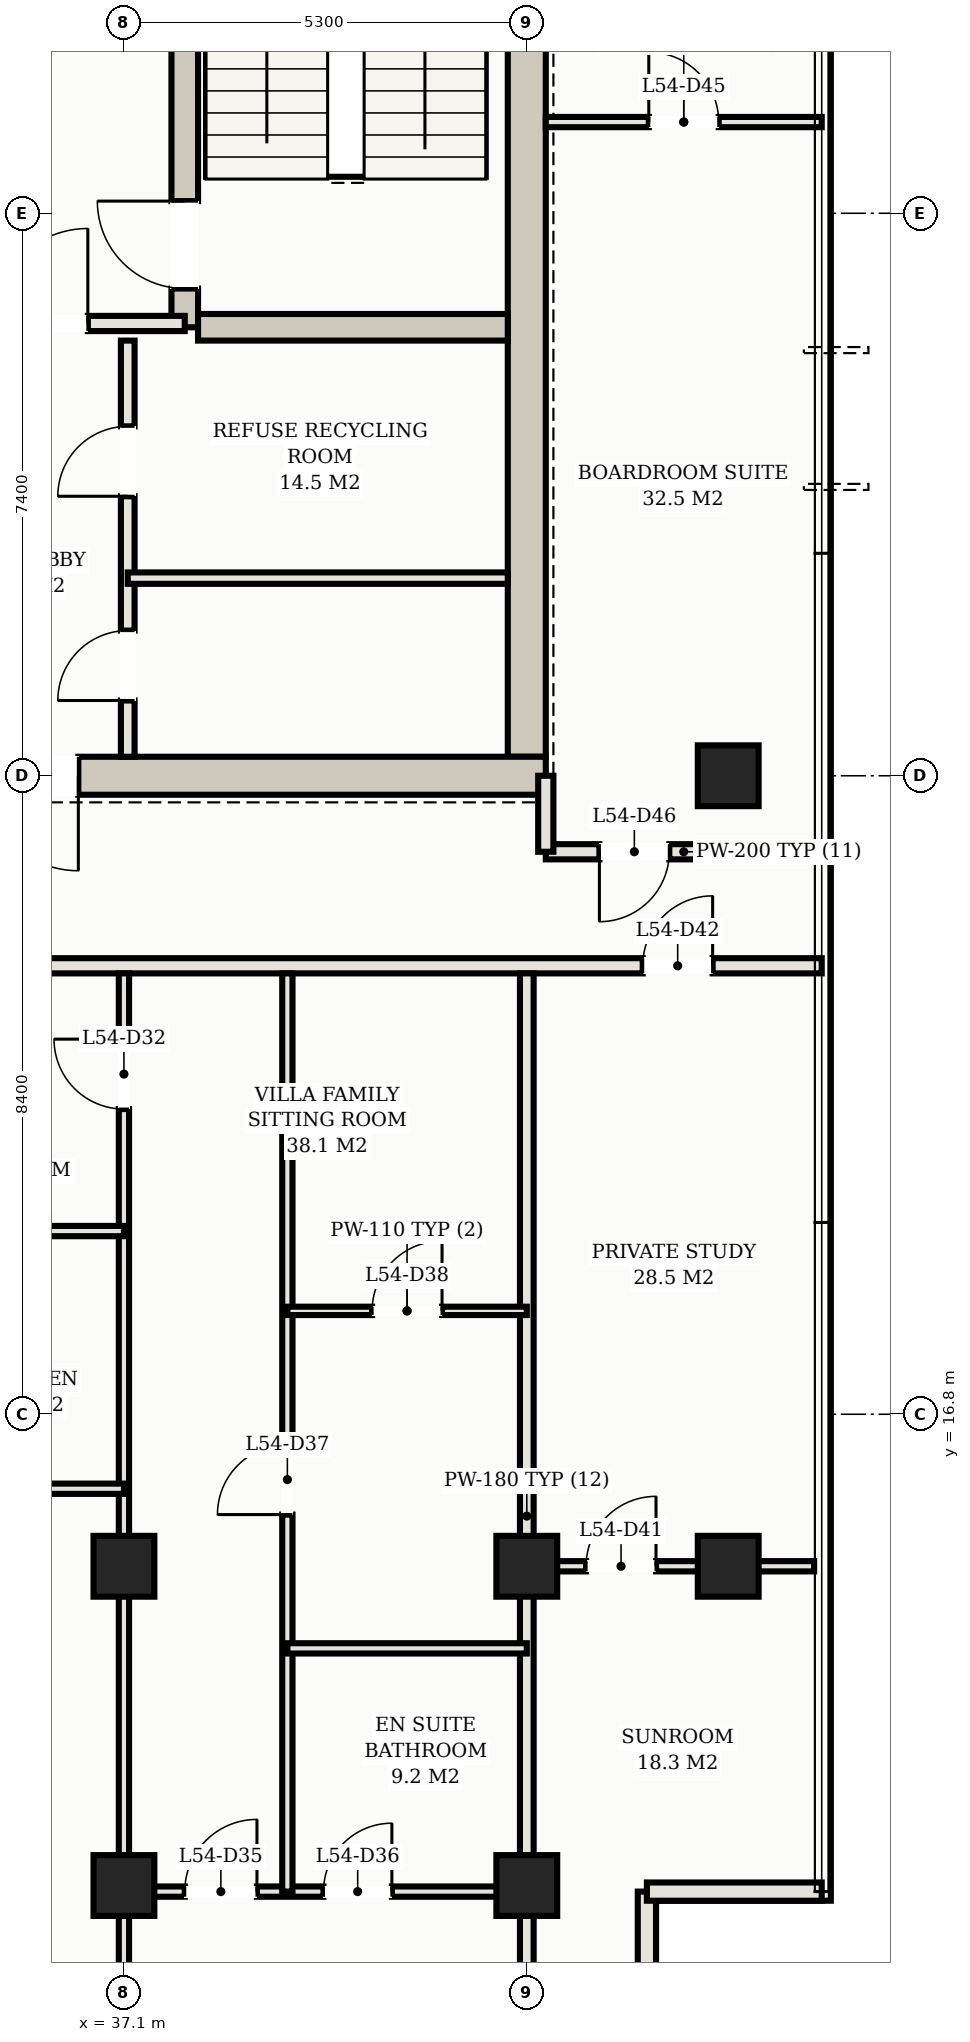
"""IFC4 building model, lengths in metres.
Left out: names, types, materials, properties, quantities, classifications, styles, units other than length and angle.
Written with IfcOpenShell. Run it as: python <this file> out.ifc"""

import sys

from ifc_helpers import new_model, si_unit, direction, frame, frame_2d, origin, origin_2d, place, context, subcontext, project, spatial, rectangle, hollow_rectangle, extrude, element, fill, save


model = new_model("IFC4")
c1 = context("Model", 3, precision=1e-05, world=origin(), true_north=direction((0.0, 1.0)))
c2 = subcontext(c1, "Body", "Model", "MODEL_VIEW")
j1 = project(units=[si_unit("LENGTHUNIT", "METRE"), si_unit("PLANEANGLEUNIT", "RADIAN")], contexts=[c1])
p1 = place(None, origin())
s1 = spatial("IfcSite", under=j1, at=p1, CompositionType="ELEMENT")
p2 = place(p1, origin())
s2 = spatial("IfcBuilding", under=s1, at=p2, CompositionType="ELEMENT")
p3 = place(p2, frame((0.0, 0.0, 200.0)))
s3 = spatial("IfcBuildingStorey", under=s2, at=p3, CompositionType="ELEMENT", Elevation=200.0)
p4 = place(p3, frame((42.4, 25.45, 0.0), z_axis=(0.0, 0.0, 1.0), x_axis=(0.0, 1.0, 0.0)))
e1 = element("IfcWall", 1, at=p4, inside=s3, PredefinedType="SHEAR", context=c2, shape_type="SweptSolid", body=[
    extrude(rectangle(XDim=14.3, YDim=0.5, at=frame_2d((7.15, 0.0))), origin(), (0.0, 0.0, 1.0), 3.11),
])
p5 = place(p3, frame((34.6, 25.2, 0.0), z_axis=(0.0, 0.0, 1.0), x_axis=(1.0, 0.0, 0.0)))
e2 = element("IfcWall", 2, at=p5, inside=s3, PredefinedType="SHEAR", context=c2, shape_type="SweptSolid", body=[
    extrude(rectangle(XDim=8.05, YDim=0.5, at=frame_2d((4.025, 0.0))), origin(), (0.0, 0.0, 1.0), 3.11),
])
p6 = place(p5, frame((0.65, 0.0, 0.0)))
e3 = element("IfcOpeningElement", 3, at=p6, cuts=e2, PredefinedType="OPENING", context=c2, shape_type="SweptSolid", body=[
    extrude(rectangle(XDim=1.25, YDim=2.2, at=frame_2d((0.625, 1.1))), frame((0.0, 0.26, 0.0), z_axis=(0.0, -1.0, 0.0), x_axis=(1.0, 0.0, 0.0)), (0.0, 0.0, 1.0), 0.52),
])
p7 = place(p3, frame((37.9, 31.1, 0.0), z_axis=(0.0, 0.0, 1.0), x_axis=(0.0, 1.0, 0.0)))
e4 = element("IfcWall", 4, at=p7, inside=s3, PredefinedType="SHEAR", context=c2, shape_type="SweptSolid", body=[
    extrude(rectangle(XDim=8.65, YDim=0.35, at=frame_2d((4.325, 0.0))), origin(), (0.0, 0.0, 1.0), 3.11),
])
p8 = place(p7, frame((0.51, 0.0, 0.0)))
e5 = element("IfcOpeningElement", 5, at=p8, cuts=e4, PredefinedType="OPENING", context=c2, shape_type="SweptSolid", body=[
    extrude(rectangle(XDim=1.15, YDim=2.2, at=frame_2d((0.575, 1.1))), frame((0.0, 0.185, 0.0), z_axis=(0.0, -1.0, 0.0), x_axis=(1.0, 0.0, 0.0)), (0.0, 0.0, 1.0), 0.37),
])
p9 = place(p3, frame((38.075, 31.1, 0.0), z_axis=(0.0, 0.0, 1.0), x_axis=(1.0, 0.0, 0.0)))
e6 = element("IfcWall", 6, at=p9, inside=s3, PredefinedType="SHEAR", context=c2, shape_type="SweptSolid", body=[
    extrude(rectangle(XDim=4.075, YDim=0.35, at=frame_2d((2.038, 0.0))), origin(), (0.0, 0.0, 1.0), 3.11),
])
for number, where, z_axis, x_axis in (
    (7, (37.1, 14.8, 0.0), (0.0, 0.0, 1.0), (1.0, 0.0, 0.0)),
    (8, (37.1, 10.6, 0.0), (0.0, 0.0, 1.0), (1.0, 0.0, 0.0)),
    (9, (42.4, 14.8, 0.0), (0.0, 0.0, 1.0), (1.0, 0.0, 0.0)),
    (10, (42.4, 10.6, 0.0), (0.0, 0.0, 1.0), (1.0, 0.0, 0.0)),
    (11, (45.05, 14.8, 0.0), (0.0, 0.0, 1.0), (1.0, 0.0, 0.0)),
    (12, (45.05, 25.2, 0.0), (0.0, 0.0, 1.0), (1.0, 0.0, 0.0)),
):
    element("IfcColumn", number, at=place(p3, frame(where, z_axis=z_axis, x_axis=x_axis)), inside=s3, PredefinedType="COLUMN", context=c2, shape_type="SweptSolid", body=[
        extrude(hollow_rectangle(XDim=0.8, YDim=0.8, WallThickness=0.028, at=origin_2d()), origin(), (0.0, 0.0, 1.0), 3.3),
    ])
for number, where, z_axis, x_axis in (
    (13, (43.98, 8.22, 0.0), (0.0, 0.0, 1.0), (0.0, 1.0, 0.0)),
    (14, (43.98, 10.52, 0.0), (0.0, 0.0, 1.0), (1.0, 0.0, 0.0)),
):
    element("IfcWall", number, at=place(p3, frame(where, z_axis=z_axis, x_axis=x_axis)), inside=s3, PredefinedType="SOLIDWALL", context=c2, shape_type="SweptSolid", body=[
        extrude(rectangle(XDim=2.3, YDim=0.24, at=frame_2d((1.15, 0.0))), origin(), (0.0, 0.0, 1.0), 3.11),
    ])
p10 = place(p3, frame((34.65, 31.15, 0.0), z_axis=(0.0, 0.0, 1.0), x_axis=(1.0, 0.0, 0.0)))
e15 = element("IfcWall", 15, at=p10, inside=s3, PredefinedType="PARTITIONING", context=c2, shape_type="SweptSolid", body=[
    extrude(rectangle(XDim=3.25, YDim=0.2, at=frame_2d((1.625, 0.0))), origin(), (0.0, 0.0, 1.0), 2.43),
])
p11 = place(p10, frame((0.725, 0.0, 0.0)))
e16 = element("IfcOpeningElement", 16, at=p11, cuts=e15, PredefinedType="OPENING", context=c2, shape_type="SweptSolid", body=[
    extrude(rectangle(XDim=1.25, YDim=2.2, at=frame_2d((0.625, 1.1))), frame((0.0, 0.11, 0.0), z_axis=(0.0, -1.0, 0.0), x_axis=(1.0, 0.0, 0.0)), (0.0, 0.0, 1.0), 0.22),
])
p12 = place(p3, frame((37.15, 25.45, 0.0), z_axis=(0.0, 0.0, 1.0), x_axis=(0.0, 1.0, 0.0)))
e17 = element("IfcWall", 17, at=p12, inside=s3, PredefinedType="PARTITIONING", context=c2, shape_type="SweptSolid", body=[
    extrude(rectangle(XDim=5.475, YDim=0.18, at=frame_2d((2.738, 0.0))), origin(), (0.0, 0.0, 1.0), 2.43),
])
p13 = place(p12, frame((0.74, 0.0, 0.0)))
e18 = element("IfcOpeningElement", 18, at=p13, cuts=e17, PredefinedType="OPENING", context=c2, shape_type="SweptSolid", body=[
    extrude(rectangle(XDim=0.92, YDim=2.15, at=frame_2d((0.46, 1.075))), frame((0.0, 0.1, 0.0), z_axis=(0.0, -1.0, 0.0), x_axis=(1.0, 0.0, 0.0)), (0.0, 0.0, 1.0), 0.2),
])
p14 = place(p12, frame((3.427, 0.0, 0.0)))
e19 = element("IfcOpeningElement", 19, at=p14, cuts=e17, PredefinedType="OPENING", context=c2, shape_type="SweptSolid", body=[
    extrude(rectangle(XDim=0.92, YDim=2.15, at=frame_2d((0.46, 1.075))), frame((0.0, 0.1, 0.0), z_axis=(0.0, -1.0, 0.0), x_axis=(1.0, 0.0, 0.0)), (0.0, 0.0, 1.0), 0.2),
])
p15 = place(p3, frame((37.15, 27.8, 0.0), z_axis=(0.0, 0.0, 1.0), x_axis=(1.0, 0.0, 0.0)))
e20 = element("IfcWall", 20, at=p15, inside=s3, PredefinedType="PARTITIONING", context=c2, shape_type="SweptSolid", body=[
    extrude(rectangle(XDim=5.0, YDim=0.15, at=frame_2d((2.5, 0.0))), origin(), (0.0, 0.0, 1.0), 2.43),
])
p16 = place(p3, frame((6.72, 22.7, 0.0), z_axis=(0.0, 0.0, 1.0), x_axis=(1.0, 0.0, 0.0)))
e21 = element("IfcWall", 21, at=p16, inside=s3, PredefinedType="PARTITIONING", context=c2, shape_type="SweptSolid", body=[
    extrude(rectangle(XDim=39.56, YDim=0.2, at=frame_2d((19.78, 0.0))), origin(), (0.0, 0.0, 1.0), 2.43),
])
p17 = place(p16, frame((4.63, 0.0, 0.0)))
e22 = element("IfcOpeningElement", 22, at=p17, cuts=e21, PredefinedType="OPENING", context=c2, shape_type="SweptSolid", body=[
    extrude(rectangle(XDim=1.1, YDim=2.25, at=frame_2d((0.55, 1.125))), frame((0.0, 0.11, 0.0), z_axis=(0.0, -1.0, 0.0), x_axis=(1.0, 0.0, 0.0)), (0.0, 0.0, 1.0), 0.22),
])
p18 = place(p16, frame((9.93, 0.0, 0.0)))
e23 = element("IfcOpeningElement", 23, at=p18, cuts=e21, PredefinedType="OPENING", context=c2, shape_type="SweptSolid", body=[
    extrude(rectangle(XDim=1.1, YDim=2.25, at=frame_2d((0.55, 1.125))), frame((0.0, 0.11, 0.0), z_axis=(0.0, -1.0, 0.0), x_axis=(1.0, 0.0, 0.0)), (0.0, 0.0, 1.0), 0.22),
])
p19 = place(p16, frame((25.83, 0.0, 0.0)))
e24 = element("IfcOpeningElement", 24, at=p19, cuts=e21, PredefinedType="OPENING", context=c2, shape_type="SweptSolid", body=[
    extrude(rectangle(XDim=1.1, YDim=2.25, at=frame_2d((0.55, 1.125))), frame((0.0, 0.11, 0.0), z_axis=(0.0, -1.0, 0.0), x_axis=(1.0, 0.0, 0.0)), (0.0, 0.0, 1.0), 0.22),
])
p20 = place(p16, frame((1.435, 0.0, 0.0)))
e25 = element("IfcOpeningElement", 25, at=p20, cuts=e21, PredefinedType="OPENING", context=c2, shape_type="SweptSolid", body=[
    extrude(rectangle(XDim=0.92, YDim=2.15, at=frame_2d((0.46, 1.075))), frame((0.0, 0.11, 0.0), z_axis=(0.0, -1.0, 0.0), x_axis=(1.0, 0.0, 0.0)), (0.0, 0.0, 1.0), 0.22),
])
p21 = place(p16, frame((37.205, 0.0, 0.0)))
e26 = element("IfcOpeningElement", 26, at=p21, cuts=e21, PredefinedType="OPENING", context=c2, shape_type="SweptSolid", body=[
    extrude(rectangle(XDim=0.92, YDim=2.15, at=frame_2d((0.46, 1.075))), frame((0.0, 0.11, 0.0), z_axis=(0.0, -1.0, 0.0), x_axis=(1.0, 0.0, 0.0)), (0.0, 0.0, 1.0), 0.22),
])
p22 = place(p3, frame((42.65, 24.2, 0.0), z_axis=(0.0, 0.0, 1.0), x_axis=(1.0, 0.0, 0.0)))
e27 = element("IfcWall", 27, at=p22, inside=s3, PredefinedType="PARTITIONING", context=c2, shape_type="SweptSolid", body=[
    extrude(rectangle(XDim=3.63, YDim=0.2, at=frame_2d((1.815, 0.0))), origin(), (0.0, 0.0, 1.0), 2.43),
])
p23 = place(p22, frame((0.705, 0.0, 0.0)))
e28 = element("IfcOpeningElement", 28, at=p23, cuts=e27, PredefinedType="OPENING", context=c2, shape_type="SweptSolid", body=[
    extrude(rectangle(XDim=0.92, YDim=2.15, at=frame_2d((0.46, 1.075))), frame((0.0, 0.11, 0.0), z_axis=(0.0, -1.0, 0.0), x_axis=(1.0, 0.0, 0.0)), (0.0, 0.0, 1.0), 0.22),
])
p24 = place(p3, frame((42.65, 24.2, 0.0), z_axis=(0.0, 0.0, 1.0), x_axis=(0.0, 1.0, 0.0)))
e29 = element("IfcWall", 29, at=p24, inside=s3, PredefinedType="PARTITIONING", context=c2, shape_type="SweptSolid", body=[
    extrude(rectangle(XDim=1.0, YDim=0.2, at=frame_2d((0.5, 0.0))), origin(), (0.0, 0.0, 1.0), 2.43),
])
p25 = place(p3, frame((42.4, 8.32, 0.0), z_axis=(0.0, 0.0, 1.0), x_axis=(0.0, 1.0, 0.0)))
e30 = element("IfcWall", 30, at=p25, inside=s3, PredefinedType="PARTITIONING", context=c2, shape_type="SweptSolid", body=[
    extrude(rectangle(XDim=14.28, YDim=0.18, at=frame_2d((7.14, 0.0))), origin(), (0.0, 0.0, 1.0), 2.43),
])
p26 = place(p3, frame((37.1, 6.02, 0.0), z_axis=(0.0, 0.0, 1.0), x_axis=(0.0, 1.0, 0.0)))
e31 = element("IfcWall", 31, at=p26, inside=s3, PredefinedType="PARTITIONING", context=c2, shape_type="SweptSolid", body=[
    extrude(rectangle(XDim=16.58, YDim=0.135, at=frame_2d((8.29, 0.0))), origin(), (0.0, 0.0, 1.0), 2.43),
])
p27 = place(p26, frame((14.795, 0.0, 0.0)))
e32 = element("IfcOpeningElement", 32, at=p27, cuts=e31, PredefinedType="OPENING", context=c2, shape_type="SweptSolid", body=[
    extrude(rectangle(XDim=0.92, YDim=2.15, at=frame_2d((0.46, 1.075))), frame((0.0, 0.078, 0.0), z_axis=(0.0, -1.0, 0.0), x_axis=(1.0, 0.0, 0.0)), (0.0, 0.0, 1.0), 0.155),
])
for number, where, z_axis, x_axis in (
    (33, (33.95, 15.82, 0.0), (0.0, 0.0, 1.0), (1.0, 0.0, 0.0)),
    (34, (33.95, 19.21, 0.0), (0.0, 0.0, 1.0), (1.0, 0.0, 0.0)),
):
    element("IfcWall", number, at=place(p3, frame(where, z_axis=z_axis, x_axis=x_axis)), inside=s3, PredefinedType="PARTITIONING", context=c2, shape_type="SweptSolid", body=[
        extrude(rectangle(XDim=3.15, YDim=0.135, at=frame_2d((1.575, 0.0))), origin(), (0.0, 0.0, 1.0), 2.43),
    ])
p28 = place(p3, frame((37.1, 10.52, 0.0), z_axis=(0.0, 0.0, 1.0), x_axis=(1.0, 0.0, 0.0)))
e35 = element("IfcWall", 35, at=p28, inside=s3, PredefinedType="PARTITIONING", context=c2, shape_type="SweptSolid", body=[
    extrude(rectangle(XDim=5.3, YDim=0.135, at=frame_2d((2.65, 0.0))), origin(), (0.0, 0.0, 1.0), 2.43),
])
p29 = place(p28, frame((0.8, 0.0, 0.0)))
e36 = element("IfcOpeningElement", 36, at=p29, cuts=e35, PredefinedType="OPENING", context=c2, shape_type="SweptSolid", body=[
    extrude(rectangle(XDim=0.95, YDim=2.15, at=frame_2d((0.475, 1.075))), frame((0.0, 0.078, 0.0), z_axis=(0.0, -1.0, 0.0), x_axis=(1.0, 0.0, 0.0)), (0.0, 0.0, 1.0), 0.155),
])
p30 = place(p28, frame((2.625, 0.0, 0.0)))
e37 = element("IfcOpeningElement", 37, at=p30, cuts=e35, PredefinedType="OPENING", context=c2, shape_type="SweptSolid", body=[
    extrude(rectangle(XDim=0.9, YDim=2.15, at=frame_2d((0.45, 1.075))), frame((0.0, 0.078, 0.0), z_axis=(0.0, -1.0, 0.0), x_axis=(1.0, 0.0, 0.0)), (0.0, 0.0, 1.0), 0.155),
])
p31 = place(p3, frame((39.25, 10.52, 0.0), z_axis=(0.0, 0.0, 1.0), x_axis=(0.0, 1.0, 0.0)))
e38 = element("IfcWall", 38, at=p31, inside=s3, PredefinedType="PARTITIONING", context=c2, shape_type="SweptSolid", body=[
    extrude(rectangle(XDim=12.08, YDim=0.135, at=frame_2d((6.04, 0.0))), origin(), (0.0, 0.0, 1.0), 2.43),
])
p32 = place(p31, frame((4.96, 0.0, 0.0)))
e39 = element("IfcOpeningElement", 39, at=p32, cuts=e38, PredefinedType="OPENING", context=c2, shape_type="SweptSolid", body=[
    extrude(rectangle(XDim=0.92, YDim=2.15, at=frame_2d((0.46, 1.075))), frame((0.0, 0.078, 0.0), z_axis=(0.0, -1.0, 0.0), x_axis=(1.0, 0.0, 0.0)), (0.0, 0.0, 1.0), 0.155),
])
p33 = place(p3, frame((39.25, 13.72, 0.0), z_axis=(0.0, 0.0, 1.0), x_axis=(1.0, 0.0, 0.0)))
e40 = element("IfcWall", 40, at=p33, inside=s3, PredefinedType="PARTITIONING", context=c2, shape_type="SweptSolid", body=[
    extrude(rectangle(XDim=3.15, YDim=0.135, at=frame_2d((1.575, 0.0))), origin(), (0.0, 0.0, 1.0), 2.43),
])
p34 = place(p3, frame((39.25, 18.16, 0.0), z_axis=(0.0, 0.0, 1.0), x_axis=(1.0, 0.0, 0.0)))
e41 = element("IfcWall", 41, at=p34, inside=s3, PredefinedType="MOVABLE", context=c2, shape_type="SweptSolid", body=[
    extrude(rectangle(XDim=3.15, YDim=0.11, at=frame_2d((1.575, 0.0))), origin(), (0.0, 0.0, 1.0), 2.43),
])
p35 = place(p34, frame((1.115, 0.0, 0.0)))
e42 = element("IfcOpeningElement", 42, at=p35, cuts=e41, PredefinedType="OPENING", context=c2, shape_type="SweptSolid", body=[
    extrude(rectangle(XDim=0.92, YDim=2.15, at=frame_2d((0.46, 1.075))), frame((0.0, 0.065, 0.0), z_axis=(0.0, -1.0, 0.0), x_axis=(1.0, 0.0, 0.0)), (0.0, 0.0, 1.0), 0.13),
])
p36 = place(p3, frame((42.4, 14.8, 0.0), z_axis=(0.0, 0.0, 1.0), x_axis=(1.0, 0.0, 0.0)))
e43 = element("IfcWall", 43, at=p36, inside=s3, PredefinedType="PARTITIONING", context=c2, shape_type="SweptSolid", body=[
    extrude(rectangle(XDim=3.78, YDim=0.135, at=frame_2d((1.89, 0.0))), origin(), (0.0, 0.0, 1.0), 2.43),
])
p37 = place(p36, frame((0.78, 0.0, 0.0)))
e44 = element("IfcOpeningElement", 44, at=p37, cuts=e43, PredefinedType="OPENING", context=c2, shape_type="SweptSolid", body=[
    extrude(rectangle(XDim=0.92, YDim=2.15, at=frame_2d((0.46, 1.075))), frame((0.0, 0.078, 0.0), z_axis=(0.0, -1.0, 0.0), x_axis=(1.0, 0.0, 0.0)), (0.0, 0.0, 1.0), 0.155),
])
p38 = place(p3, frame((42.65, 33.8, 0.0), z_axis=(0.0, 0.0, 1.0), x_axis=(1.0, 0.0, 0.0)))
e45 = element("IfcWall", 45, at=p38, inside=s3, PredefinedType="PARTITIONING", context=c2, shape_type="SweptSolid", body=[
    extrude(rectangle(XDim=3.63, YDim=0.135, at=frame_2d((1.815, 0.0))), origin(), (0.0, 0.0, 1.0), 2.43),
])
p39 = place(p38, frame((1.355, 0.0, 0.0)))
e46 = element("IfcOpeningElement", 46, at=p39, cuts=e45, PredefinedType="OPENING", context=c2, shape_type="SweptSolid", body=[
    extrude(rectangle(XDim=0.92, YDim=2.15, at=frame_2d((0.46, 1.075))), frame((0.0, 0.078, 0.0), z_axis=(0.0, -1.0, 0.0), x_axis=(1.0, 0.0, 0.0)), (0.0, 0.0, 1.0), 0.155),
])
p40 = place(p6, frame((1.25, 0.0, 0.0), z_axis=(0.0, 0.0, 1.0), x_axis=(-1.0, 0.0, 0.0)))
e47 = element("IfcDoor", 47, at=p40, inside=s3, OperationType="SINGLE_SWING_LEFT", PredefinedType="DOOR", context=c2, shape_type="SweptSolid", body=[
    extrude(rectangle(XDim=1.25, YDim=2.2, at=frame_2d((0.625, 1.1))), frame((0.0, 0.025, 0.0), z_axis=(0.0, -1.0, 0.0), x_axis=(1.0, 0.0, 0.0)), (0.0, 0.0, 1.0), 0.05),
])
fill(e3, e47)
p41 = place(p11, origin())
e48 = element("IfcDoor", 48, at=p41, inside=s3, OperationType="SINGLE_SWING_RIGHT", PredefinedType="DOOR", context=c2, shape_type="SweptSolid", body=[
    extrude(rectangle(XDim=1.25, YDim=2.2, at=frame_2d((0.625, 1.1))), frame((0.0, 0.025, 0.0), z_axis=(0.0, -1.0, 0.0), x_axis=(1.0, 0.0, 0.0)), (0.0, 0.0, 1.0), 0.05),
])
fill(e16, e48)
p42 = place(p8, origin())
e49 = element("IfcDoor", 49, at=p42, inside=s3, OperationType="SINGLE_SWING_RIGHT", PredefinedType="DOOR", context=c2, shape_type="SweptSolid", body=[
    extrude(rectangle(XDim=1.15, YDim=2.2, at=frame_2d((0.575, 1.1))), frame((0.0, 0.025, 0.0), z_axis=(0.0, -1.0, 0.0), x_axis=(1.0, 0.0, 0.0)), (0.0, 0.0, 1.0), 0.05),
])
fill(e5, e49)
p43 = place(p13, origin())
e50 = element("IfcDoor", 50, at=p43, inside=s3, OperationType="SINGLE_SWING_LEFT", PredefinedType="DOOR", context=c2, shape_type="SweptSolid", body=[
    extrude(rectangle(XDim=0.92, YDim=2.15, at=frame_2d((0.46, 1.075))), frame((0.0, 0.025, 0.0), z_axis=(0.0, -1.0, 0.0), x_axis=(1.0, 0.0, 0.0)), (0.0, 0.0, 1.0), 0.05),
])
fill(e18, e50)
p44 = place(p14, origin())
e51 = element("IfcDoor", 51, at=p44, inside=s3, OperationType="SINGLE_SWING_LEFT", PredefinedType="DOOR", context=c2, shape_type="SweptSolid", body=[
    extrude(rectangle(XDim=0.92, YDim=2.15, at=frame_2d((0.46, 1.075))), frame((0.0, 0.025, 0.0), z_axis=(0.0, -1.0, 0.0), x_axis=(1.0, 0.0, 0.0)), (0.0, 0.0, 1.0), 0.05),
])
fill(e19, e51)
p45 = place(p27, origin())
e52 = element("IfcDoor", 52, at=p45, inside=s3, OperationType="SINGLE_SWING_RIGHT", PredefinedType="DOOR", context=c2, shape_type="SweptSolid", body=[
    extrude(rectangle(XDim=0.92, YDim=2.15, at=frame_2d((0.46, 1.075))), frame((0.0, 0.025, 0.0), z_axis=(0.0, -1.0, 0.0), x_axis=(1.0, 0.0, 0.0)), (0.0, 0.0, 1.0), 0.05),
])
fill(e32, e52)
p46 = place(p29, origin())
e53 = element("IfcDoor", 53, at=p46, inside=s3, OperationType="SINGLE_SWING_RIGHT", PredefinedType="DOOR", context=c2, shape_type="SweptSolid", body=[
    extrude(rectangle(XDim=0.95, YDim=2.15, at=frame_2d((0.475, 1.075))), frame((0.0, 0.025, 0.0), z_axis=(0.0, -1.0, 0.0), x_axis=(1.0, 0.0, 0.0)), (0.0, 0.0, 1.0), 0.05),
])
fill(e36, e53)
p47 = place(p30, origin())
e54 = element("IfcDoor", 54, at=p47, inside=s3, OperationType="SINGLE_SWING_RIGHT", PredefinedType="DOOR", context=c2, shape_type="SweptSolid", body=[
    extrude(rectangle(XDim=0.9, YDim=2.15, at=frame_2d((0.45, 1.075))), frame((0.0, 0.025, 0.0), z_axis=(0.0, -1.0, 0.0), x_axis=(1.0, 0.0, 0.0)), (0.0, 0.0, 1.0), 0.05),
])
fill(e37, e54)
p48 = place(p32, origin())
e55 = element("IfcDoor", 55, at=p48, inside=s3, OperationType="SINGLE_SWING_LEFT", PredefinedType="DOOR", context=c2, shape_type="SweptSolid", body=[
    extrude(rectangle(XDim=0.92, YDim=2.15, at=frame_2d((0.46, 1.075))), frame((0.0, 0.025, 0.0), z_axis=(0.0, -1.0, 0.0), x_axis=(1.0, 0.0, 0.0)), (0.0, 0.0, 1.0), 0.05),
])
fill(e39, e55)
p49 = place(p35, origin())
e56 = element("IfcDoor", 56, at=p49, inside=s3, OperationType="SINGLE_SWING_RIGHT", PredefinedType="DOOR", context=c2, shape_type="SweptSolid", body=[
    extrude(rectangle(XDim=0.92, YDim=2.15, at=frame_2d((0.46, 1.075))), frame((0.0, 0.025, 0.0), z_axis=(0.0, -1.0, 0.0), x_axis=(1.0, 0.0, 0.0)), (0.0, 0.0, 1.0), 0.05),
])
fill(e42, e56)
p50 = place(p37, origin())
e57 = element("IfcDoor", 57, at=p50, inside=s3, OperationType="SINGLE_SWING_RIGHT", PredefinedType="DOOR", context=c2, shape_type="SweptSolid", body=[
    extrude(rectangle(XDim=0.92, YDim=2.15, at=frame_2d((0.46, 1.075))), frame((0.0, 0.025, 0.0), z_axis=(0.0, -1.0, 0.0), x_axis=(1.0, 0.0, 0.0)), (0.0, 0.0, 1.0), 0.05),
])
fill(e44, e57)
p51 = place(p21, origin())
e58 = element("IfcDoor", 58, at=p51, inside=s3, OperationType="SINGLE_SWING_RIGHT", PredefinedType="DOOR", context=c2, shape_type="SweptSolid", body=[
    extrude(rectangle(XDim=0.92, YDim=2.15, at=frame_2d((0.46, 1.075))), frame((0.0, 0.025, 0.0), z_axis=(0.0, -1.0, 0.0), x_axis=(1.0, 0.0, 0.0)), (0.0, 0.0, 1.0), 0.05),
])
fill(e26, e58)
p52 = place(p39, origin())
e59 = element("IfcDoor", 59, at=p52, inside=s3, OperationType="SINGLE_SWING_LEFT", PredefinedType="DOOR", context=c2, shape_type="SweptSolid", body=[
    extrude(rectangle(XDim=0.92, YDim=2.15, at=frame_2d((0.46, 1.075))), frame((0.0, 0.025, 0.0), z_axis=(0.0, -1.0, 0.0), x_axis=(1.0, 0.0, 0.0)), (0.0, 0.0, 1.0), 0.05),
])
fill(e46, e59)
p53 = place(p23, frame((0.92, 0.0, 0.0), z_axis=(0.0, 0.0, 1.0), x_axis=(-1.0, 0.0, 0.0)))
e60 = element("IfcDoor", 60, at=p53, inside=s3, OperationType="SINGLE_SWING_RIGHT", PredefinedType="DOOR", context=c2, shape_type="SweptSolid", body=[
    extrude(rectangle(XDim=0.92, YDim=2.15, at=frame_2d((0.46, 1.075))), frame((0.0, 0.025, 0.0), z_axis=(0.0, -1.0, 0.0), x_axis=(1.0, 0.0, 0.0)), (0.0, 0.0, 1.0), 0.05),
])
fill(e28, e60)
save(model, sys.argv[1])
